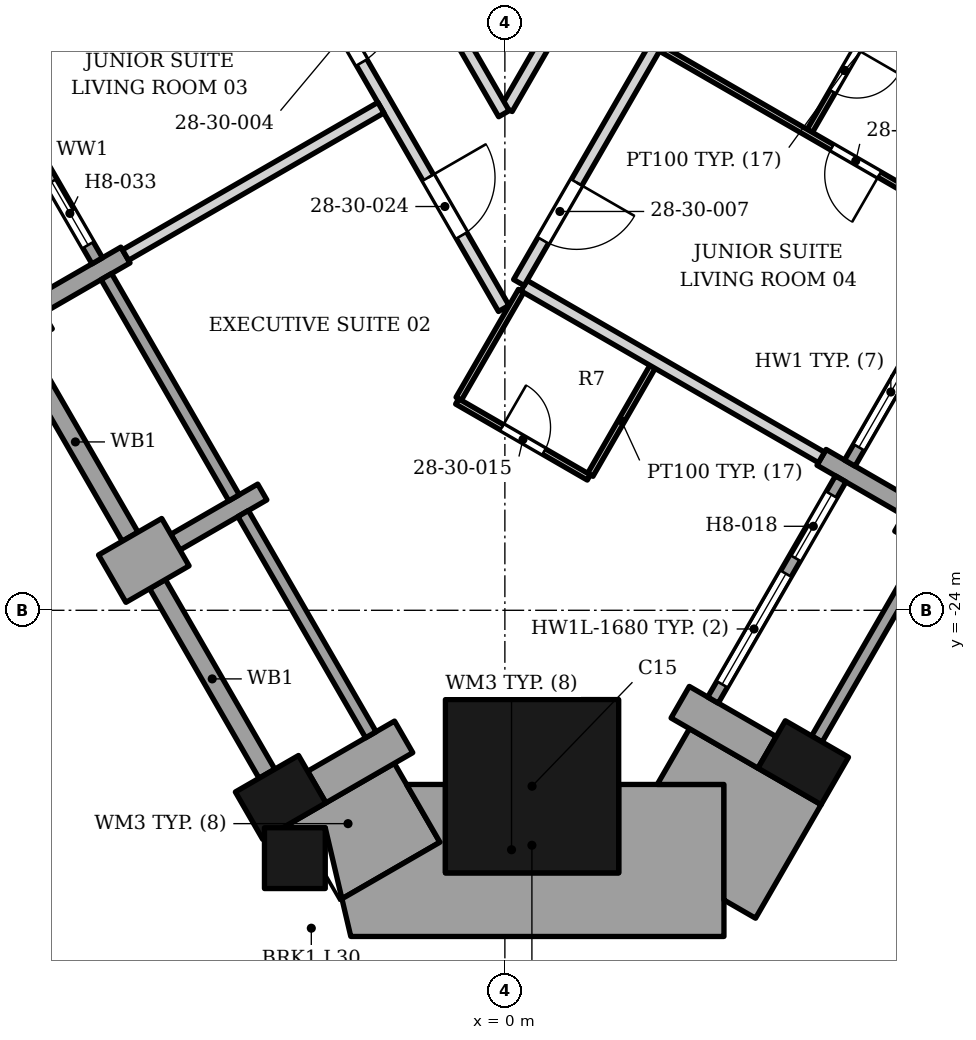
"""IFC4 building model, lengths in metres.
Left out: names, types, materials, properties, quantities, classifications, styles, units other than length and angle.
Written with IfcOpenShell. Run it as: python <this file> out.ifc"""

import sys

from ifc_helpers import new_model, si_unit, direction, frame, frame_2d, origin, origin_2d, place, context, subcontext, project, spatial, polyline, rectangle, outline, extrude, element, fill, save


model = new_model("IFC4")
c1 = context("Model", 3, precision=1e-05, world=origin(), true_north=direction((0.0, 1.0)))
c2 = subcontext(c1, "Body", "Model", "MODEL_VIEW")
j1 = project(units=[si_unit("LENGTHUNIT", "METRE"), si_unit("PLANEANGLEUNIT", "RADIAN")], contexts=[c1])
p1 = place(None, origin())
s1 = spatial("IfcSite", under=j1, at=p1, CompositionType="ELEMENT")
p2 = place(p1, origin())
s2 = spatial("IfcBuilding", under=s1, at=p2, CompositionType="ELEMENT")
p3 = place(p2, frame((0.0, 0.0, 122.4)))
s3 = spatial("IfcBuildingStorey", under=s2, at=p3, CompositionType="ELEMENT", Elevation=122.4)
p4 = place(p3, frame((0.447, -26.893, 0.0), z_axis=(0.0, 0.0, 1.0), x_axis=(0.0, 1.0, 0.0)))
e1 = element("IfcColumn", 1, at=p4, inside=s3, PredefinedType="COLUMN", context=c2, shape_type="SweptSolid", body=[
    extrude(rectangle(XDim=2.85, YDim=2.85, at=origin_2d()), origin(), (0.0, 0.0, 1.0), 3.4),
])
for number, where, z_axis, x_axis in (
    (2, (-8.188, -19.282, 0.0), (0.0, 0.0, 1.0), (0.5, -0.866, 0.0)),
    (3, (-3.688, -27.077, 0.0), (0.0, 0.0, 1.0), (0.5, -0.866, 0.0)),
    (4, (4.907, -26.506, 0.0), (0.0, 0.0, 1.0), (0.5, 0.866, 0.0)),
):
    element("IfcColumn", number, at=place(p3, frame(where, z_axis=z_axis, x_axis=x_axis)), inside=s3, PredefinedType="COLUMN", context=c2, shape_type="SweptSolid", body=[
        extrude(rectangle(XDim=0.9, YDim=1.2, at=origin_2d()), origin(), (0.0, 0.0, 1.0), 3.4),
    ])
p5 = place(p3, frame((-6.24, -18.157, 0.0), z_axis=(0.0, 0.0, 1.0), x_axis=(-0.866030301974, -0.499991515992, 0.0)))
e5 = element("IfcWall", 5, at=p5, inside=s3, PredefinedType="SOLIDWALL", context=c2, shape_type="SweptSolid", body=[
    extrude(rectangle(XDim=1.649, YDim=0.3, at=frame_2d((0.825, 0.0))), origin(), (0.0, 0.0, 1.0), 2.65),
])
p6 = place(p3, frame((-6.458, -23.479, 0.0), z_axis=(0.0, 0.0, 1.0), x_axis=(0.866043267704, 0.499969057507, 0.0)))
e6 = element("IfcWall", 6, at=p6, inside=s3, PredefinedType="SOLIDWALL", context=c2, shape_type="SweptSolid", body=[
    extrude(rectangle(XDim=1.2, YDim=0.9, at=frame_2d((0.6, 0.0))), origin(), (0.0, 0.0, 1.0), 2.63),
])
p7 = place(p3, frame((-3.99, -22.055, 0.0), z_axis=(0.0, 0.0, 1.0), x_axis=(-0.866040211805, -0.499974350878, 0.0)))
e7 = element("IfcWall", 7, at=p7, inside=s3, PredefinedType="SOLIDWALL", context=c2, shape_type="SweptSolid", body=[
    extrude(rectangle(XDim=1.65, YDim=0.3, at=frame_2d((0.825, 0.0))), origin(), (0.0, 0.0, 1.0), 2.474),
])
p8 = place(p3, frame((-3.094, -26.906, 0.0), z_axis=(0.0, 0.0, 1.0), x_axis=(0.866040211805, 0.499974350878, 0.0)))
e8 = element("IfcWall", 8, at=p8, inside=s3, PredefinedType="SOLIDWALL", context=c2, shape_type="SweptSolid", body=[
    extrude(rectangle(XDim=1.65, YDim=0.6, at=frame_2d((0.825, 0.0))), origin(), (0.0, 0.0, 1.0), 2.45),
])
p9 = place(p3, frame((-8.804, -14.615, 0.0), z_axis=(0.0, 0.0, 1.0), x_axis=(0.500002543286, -0.866023935413, 0.0)))
e9 = element("IfcWall", 9, at=p9, inside=s3, PredefinedType="ELEMENTEDWALL", context=c2, shape_type="SweptSolid", body=[
    extrude(rectangle(XDim=4.2, YDim=0.2, at=frame_2d((2.1, 0.0))), origin(), (0.0, 0.0, 1.0), 2.65),
])
p10 = place(p9, frame((0.3, 0.0, 0.6)))
e10 = element("IfcOpeningElement", 10, at=p10, cuts=e9, PredefinedType="OPENING", context=c2, shape_type="SweptSolid", body=[
    extrude(rectangle(XDim=2.1, YDim=1.8, at=frame_2d((1.05, 0.9))), frame((0.0, 0.11, 0.0), z_axis=(0.0, -1.0, 0.0), x_axis=(1.0, 0.0, 0.0)), (0.0, 0.0, 1.0), 0.22),
])
p11 = place(p9, frame((2.7, 0.0, 0.0)))
e11 = element("IfcOpeningElement", 11, at=p11, cuts=e9, PredefinedType="OPENING", context=c2, shape_type="SweptSolid", body=[
    extrude(rectangle(XDim=1.2, YDim=2.4, at=frame_2d((0.6, 1.2))), frame((0.0, 0.11, 0.0), z_axis=(0.0, -1.0, 0.0), x_axis=(1.0, 0.0, 0.0)), (0.0, 0.0, 1.0), 0.22),
])
p12 = place(p3, frame((-7.963, -19.672, 0.0), z_axis=(0.0, 0.0, 1.0), x_axis=(0.500012057535, -0.866018442252, 0.0)))
e12 = element("IfcWall", 12, at=p12, inside=s3, PredefinedType="SOLIDWALL", context=c2, shape_type="SweptSolid", body=[
    extrude(rectangle(XDim=3.6, YDim=0.3, at=frame_2d((1.8, 0.0))), origin(), (0.0, 0.0, 1.0), 2.63),
])
p13 = place(p3, frame((-6.554, -18.512, 0.0), z_axis=(0.0, 0.0, 1.0), x_axis=(0.500027713859, -0.866009402589, 0.0)))
e13 = element("IfcWall", 13, at=p13, inside=s3, PredefinedType="ELEMENTEDWALL", context=c2, shape_type="SweptSolid", body=[
    extrude(rectangle(XDim=4.2, YDim=0.2, at=frame_2d((2.1, 0.0))), origin(), (0.0, 0.0, 1.0), 2.474),
])
p14 = place(p3, frame((-5.713, -23.569, 0.0), z_axis=(0.0, 0.0, 1.0), x_axis=(0.500012057535, -0.866018442252, 0.0)))
e14 = element("IfcWall", 14, at=p14, inside=s3, PredefinedType="SOLIDWALL", context=c2, shape_type="SweptSolid", body=[
    extrude(rectangle(XDim=3.6, YDim=0.3, at=frame_2d((1.8, 0.0))), origin(), (0.0, 0.0, 1.0), 2.45),
])
p15 = place(p3, frame((-4.304, -22.409, 0.0), z_axis=(0.0, 0.0, 1.0), x_axis=(0.500002543286, -0.866023935413, 0.0)))
e15 = element("IfcWall", 15, at=p15, inside=s3, PredefinedType="ELEMENTEDWALL", context=c2, shape_type="SweptSolid", body=[
    extrude(rectangle(XDim=4.2, YDim=0.2, at=frame_2d((2.1, 0.0))), origin(), (0.0, 0.0, 1.0), 2.384),
])
p16 = place(p3, frame((4.312, -26.336, 0.0), z_axis=(0.0, 0.0, 1.0), x_axis=(-0.865976140824, 0.500085316245, 0.0)))
e16 = element("IfcWall", 16, at=p16, inside=s3, PredefinedType="SOLIDWALL", context=c2, shape_type="SweptSolid", body=[
    extrude(rectangle(XDim=1.65, YDim=0.6, at=frame_2d((0.825, 0.0))), origin(), (0.0, 0.0, 1.0), 2.45),
])
p17 = place(p3, frame((7.676, -22.909, 0.0), z_axis=(0.0, 0.0, 1.0), x_axis=(-0.866094119867, 0.499880961361, 0.0)))
e17 = element("IfcWall", 17, at=p17, inside=s3, PredefinedType="SOLIDWALL", context=c2, shape_type="SweptSolid", body=[
    extrude(rectangle(XDim=1.2, YDim=0.9, at=frame_2d((0.6, 0.0))), origin(), (0.0, 0.0, 1.0), 2.628),
])
p18 = place(p3, frame((6.637, -22.309, 0.0), z_axis=(0.0, 0.0, 1.0), x_axis=(-0.866040211805, 0.499974350878, 0.0)))
e18 = element("IfcWall", 18, at=p18, inside=s3, PredefinedType="SOLIDWALL", context=c2, shape_type="SweptSolid", body=[
    extrude(rectangle(XDim=1.65, YDim=0.3, at=frame_2d((0.825, 0.0))), origin(), (0.0, 0.0, 1.0), 2.628),
])
p19 = place(p3, origin())
e19 = element("IfcWall", 19, at=p19, inside=s3, PredefinedType="SOLIDWALL", context=c2, shape_type="SweptSolid", body=[
    extrude(outline(polyline([(6.845, -22.949), (5.045, -26.066), (5.219, -26.166), (7.018, -23.049), (6.845, -22.949)])), origin(), (0.0, 0.0, 1.0), 2.45),
])
p20 = place(p3, frame((3.423, -25.477, 0.0), z_axis=(0.0, 0.0, 1.0), x_axis=(0.499958946799, 0.866049104564, 0.0)))
e20 = element("IfcWall", 20, at=p20, inside=s3, PredefinedType="ELEMENTEDWALL", context=c2, shape_type="SweptSolid", body=[
    extrude(rectangle(XDim=4.2, YDim=0.2, at=frame_2d((2.1, 0.0))), origin(), (0.0, 0.0, 1.0), 2.384),
])
p21 = place(p20, frame((0.3, 0.0, 0.6)))
e21 = element("IfcOpeningElement", 21, at=p21, cuts=e20, PredefinedType="OPENING", context=c2, shape_type="SweptSolid", body=[
    extrude(rectangle(XDim=2.1, YDim=1.68, at=frame_2d((1.05, 0.84))), frame((0.0, 0.11, 0.0), z_axis=(0.0, -1.0, 0.0), x_axis=(1.0, 0.0, 0.0)), (0.0, 0.0, 1.0), 0.22),
])
p22 = place(p20, frame((2.7, 0.0, 0.0)))
e22 = element("IfcOpeningElement", 22, at=p22, cuts=e20, PredefinedType="OPENING", context=c2, shape_type="SweptSolid", body=[
    extrude(rectangle(XDim=1.2, YDim=2.28, at=frame_2d((0.6, 1.14))), frame((0.0, 0.11, 0.0), z_axis=(0.0, -1.0, 0.0), x_axis=(1.0, 0.0, 0.0)), (0.0, 0.0, 1.0), 0.22),
])
p23 = place(p3, frame((5.673, -21.579, 0.0), z_axis=(0.0, 0.0, 1.0), x_axis=(0.49998411664, 0.866034573852, 0.0)))
e23 = element("IfcWall", 23, at=p23, inside=s3, PredefinedType="ELEMENTEDWALL", context=c2, shape_type="SweptSolid", body=[
    extrude(rectangle(XDim=4.2, YDim=0.2, at=frame_2d((2.1, 0.0))), origin(), (0.0, 0.0, 1.0), 2.628),
])
p24 = place(p23, frame((0.3, 0.0, 0.6)))
e24 = element("IfcOpeningElement", 24, at=p24, cuts=e23, PredefinedType="OPENING", context=c2, shape_type="SweptSolid", body=[
    extrude(rectangle(XDim=2.1, YDim=1.8, at=frame_2d((1.05, 0.9))), frame((0.0, 0.11, 0.0), z_axis=(0.0, -1.0, 0.0), x_axis=(1.0, 0.0, 0.0)), (0.0, 0.0, 1.0), 0.22),
])
p25 = place(p23, frame((2.7, 0.0, 0.0)))
e25 = element("IfcOpeningElement", 25, at=p25, cuts=e23, PredefinedType="OPENING", context=c2, shape_type="SweptSolid", body=[
    extrude(rectangle(XDim=1.2, YDim=2.4, at=frame_2d((0.6, 1.2))), frame((0.0, 0.11, 0.0), z_axis=(0.0, -1.0, 0.0), x_axis=(1.0, 0.0, 0.0)), (0.0, 0.0, 1.0), 0.22),
])
p26 = place(p3, origin())
e26 = element("IfcWall", 26, at=p26, inside=s3, PredefinedType="SOLIDWALL", context=c2, shape_type="SweptSolid", body=[
    extrude(outline(polyline([(-1.069, -27.814), (-1.818, -26.516), (-2.944, -27.167), (-2.943, -27.167), (-3.652, -27.576), (-2.954, -27.576), (-2.68, -28.744), (-1.069, -27.814)])), origin(), (0.0, 0.0, 1.0), 2.63),
])
p27 = place(p3, origin())
e27 = element("IfcWall", 27, at=p27, inside=s3, PredefinedType="SOLIDWALL", context=c2, shape_type="SweptSolid", body=[
    extrude(outline(polyline([(-0.978, -26.864), (-1.617, -26.864), (-1.069, -27.814), (-2.68, -28.744), (-2.534, -29.364), (3.603, -29.364), (3.603, -26.864), (1.872, -26.864), (1.872, -28.318), (-0.978, -28.318), (-0.978, -26.864)])), origin(), (0.0, 0.0, 1.0), 2.63),
])
p28 = place(p3, origin())
e28 = element("IfcWall", 28, at=p28, inside=s3, PredefinedType="SOLIDWALL", context=c2, shape_type="SweptSolid", body=[
    extrude(outline(polyline([(5.201, -27.196), (3.036, -25.946), (2.506, -26.864), (3.603, -26.864), (3.603, -28.764), (4.123, -29.064), (5.201, -27.196)])), origin(), (0.0, 0.0, 1.0), 2.45),
])
p29 = place(p3, frame((1.405, -21.772, 0.0), z_axis=(0.0, 0.0, 1.0), x_axis=(0.499265284884, 0.866449176415, 0.0)))
e29 = element("IfcWall", 29, at=p29, inside=s3, PredefinedType="PARTITIONING", context=c2, shape_type="SweptSolid", body=[
    extrude(rectangle(XDim=2.05, YDim=0.1, at=frame_2d((1.025, 0.0))), origin(), (0.0, 0.0, 1.0), 2.384),
])
p30 = place(p3, frame((-0.785, -20.565, 0.0), z_axis=(0.0, 0.0, 1.0), x_axis=(0.866022959057, -0.500004234368, 0.0)))
e30 = element("IfcWall", 30, at=p30, inside=s3, PredefinedType="PARTITIONING", context=c2, shape_type="SweptSolid", body=[
    extrude(rectangle(XDim=2.5, YDim=0.1, at=frame_2d((1.25, 0.0))), origin(), (0.0, 0.0, 1.0), 2.474),
])
p31 = place(p30, frame((0.85, 0.0, 0.0)))
e31 = element("IfcOpeningElement", 31, at=p31, cuts=e30, PredefinedType="OPENING", context=c2, shape_type="SweptSolid", body=[
    extrude(rectangle(XDim=0.8, YDim=2.1, at=frame_2d((0.4, 1.05))), frame((0.0, 0.06, 0.0), z_axis=(0.0, -1.0, 0.0), x_axis=(1.0, 0.0, 0.0)), (0.0, 0.0, 1.0), 0.12),
])
p32 = place(p3, frame((-5.405, -9.708, 0.0), z_axis=(0.0, 0.0, 1.0), x_axis=(0.500010215181, -0.866019505967, 0.0)))
e32 = element("IfcWall", 32, at=p32, inside=s3, PredefinedType="PARTITIONING", context=c2, shape_type="SweptSolid", body=[
    extrude(rectangle(XDim=10.771, YDim=0.2, at=frame_2d((5.386, 0.0))), origin(), (0.0, 0.0, 1.0), 2.242),
])
p33 = place(p32, frame((5.0, 0.0, 0.0)))
e33 = element("IfcOpeningElement", 33, at=p33, cuts=e32, PredefinedType="OPENING", context=c2, shape_type="SweptSolid", body=[
    extrude(rectangle(XDim=1.1, YDim=2.1, at=frame_2d((0.55, 1.05))), frame((0.0, 0.11, 0.0), z_axis=(0.0, -1.0, 0.0), x_axis=(1.0, 0.0, 0.0)), (0.0, 0.0, 1.0), 0.22),
])
p34 = place(p32, frame((8.286, 0.0, 0.0)))
e34 = element("IfcOpeningElement", 34, at=p34, cuts=e32, PredefinedType="OPENING", context=c2, shape_type="SweptSolid", body=[
    extrude(rectangle(XDim=1.1, YDim=2.1, at=frame_2d((0.55, 1.05))), frame((0.0, 0.11, 0.0), z_axis=(0.0, -1.0, 0.0), x_axis=(1.0, 0.0, 0.0)), (0.0, 0.0, 1.0), 0.22),
])
p35 = place(p3, frame((-0.76, -20.522, 0.0), z_axis=(0.0, 0.0, 1.0), x_axis=(0.500646589026, 0.865651773461, 0.0)))
e35 = element("IfcWall", 35, at=p35, inside=s3, PredefinedType="PARTITIONING", context=c2, shape_type="SweptSolid", body=[
    extrude(rectangle(XDim=2.05, YDim=0.1, at=frame_2d((1.025, 0.0))), origin(), (0.0, 0.0, 1.0), 2.474),
])
p36 = place(p3, frame((0.314, -18.661, 0.0), z_axis=(0.0, 0.0, 1.0), x_axis=(0.866027263711, -0.4999967785, 0.0)))
e36 = element("IfcWall", 36, at=p36, inside=s3, PredefinedType="PARTITIONING", context=c2, shape_type="SweptSolid", body=[
    extrude(rectangle(XDim=5.649, YDim=0.2, at=frame_2d((2.825, 0.0))), origin(), (0.0, 0.0, 1.0), 2.384),
])
p37 = place(p3, frame((-6.24, -18.158, 0.0), z_axis=(0.0, 0.0, 1.0), x_axis=(0.866175528751, 0.499739885733, 0.0)))
e37 = element("IfcWall", 37, at=p37, inside=s3, PredefinedType="PARTITIONING", context=c2, shape_type="SweptSolid", body=[
    extrude(rectangle(XDim=4.85, YDim=0.2, at=frame_2d((2.425, 0.0))), origin(), (0.0, 0.0, 1.0), 2.384),
])
p38 = place(p3, frame((5.014, -16.116, 0.0), z_axis=(0.0, 0.0, 1.0), x_axis=(0.500617411337, 0.865668647617, 0.0)))
e38 = element("IfcWall", 38, at=p38, inside=s3, PredefinedType="PARTITIONING", context=c2, shape_type="SweptSolid", body=[
    extrude(rectangle(XDim=2.298, YDim=0.1, at=frame_2d((1.149, 0.0))), origin(), (0.0, 0.0, 1.0), 3.23),
])
p39 = place(p38, frame((0.748, 0.0, 0.0)))
e39 = element("IfcOpeningElement", 39, at=p39, cuts=e38, PredefinedType="OPENING", context=c2, shape_type="SweptSolid", body=[
    extrude(rectangle(XDim=0.8, YDim=2.1, at=frame_2d((0.4, 1.05))), frame((0.0, 0.06, 0.0), z_axis=(0.0, -1.0, 0.0), x_axis=(1.0, 0.0, 0.0)), (0.0, 0.0, 1.0), 0.12),
])
p40 = place(p3, frame((0.033, -15.748, 0.0), z_axis=(0.0, 0.0, 1.0), x_axis=(0.50002566634, 0.866010584809, 0.0)))
e40 = element("IfcWall", 40, at=p40, inside=s3, PredefinedType="PARTITIONING", context=c2, shape_type="SweptSolid", body=[
    extrude(rectangle(XDim=3.229, YDim=0.2, at=frame_2d((1.615, 0.0))), origin(), (0.0, 0.0, 1.0), 2.474),
])
p41 = place(p3, frame((2.566, -14.76, 0.0), z_axis=(0.0, 0.0, 1.0), x_axis=(0.866019355129, -0.500010476433, 0.0)))
e41 = element("IfcWall", 41, at=p41, inside=s3, PredefinedType="PARTITIONING", context=c2, shape_type="SweptSolid", body=[
    extrude(rectangle(XDim=5.65, YDim=0.1, at=frame_2d((2.825, 0.0))), origin(), (0.0, 0.0, 1.0), 2.384),
])
p42 = place(p41, frame((3.25, 0.0, 0.0)))
e42 = element("IfcOpeningElement", 42, at=p42, cuts=e41, PredefinedType="OPENING", context=c2, shape_type="SweptSolid", body=[
    extrude(rectangle(XDim=0.9, YDim=2.1, at=frame_2d((0.45, 1.05))), frame((0.0, 0.06, 0.0), z_axis=(0.0, -1.0, 0.0), x_axis=(1.0, 0.0, 0.0)), (0.0, 0.0, 1.0), 0.12),
])
p43 = place(p3, frame((-5.763, -5.88, 0.0), z_axis=(0.0, 0.0, 1.0), x_axis=(0.500006842847, -0.866021453029, 0.0)))
e43 = element("IfcWall", 43, at=p43, inside=s3, PredefinedType="PARTITIONING", context=c2, shape_type="SweptSolid", body=[
    extrude(rectangle(XDim=11.493, YDim=0.2, at=frame_2d((5.747, 0.0))), origin(), (0.0, 0.0, 1.0), 2.242),
])
p44 = place(p43, frame((6.914, 0.0, 0.0)))
e44 = element("IfcOpeningElement", 44, at=p44, cuts=e43, PredefinedType="OPENING", context=c2, shape_type="SweptSolid", body=[
    extrude(rectangle(XDim=0.9, YDim=2.1, at=frame_2d((0.45, 1.05))), frame((0.0, 0.11, 0.0), z_axis=(0.0, -1.0, 0.0), x_axis=(1.0, 0.0, 0.0)), (0.0, 0.0, 1.0), 0.22),
])
p45 = place(p3, frame((0.23, -18.61, 0.0), z_axis=(0.0, 0.0, 1.0), x_axis=(0.499999197515, 0.866025867099, 0.0)))
e45 = element("IfcWall", 45, at=p45, inside=s3, PredefinedType="PARTITIONING", context=c2, shape_type="SweptSolid", body=[
    extrude(rectangle(XDim=25.76, YDim=0.2, at=frame_2d((12.88, 0.0))), origin(), (0.0, 0.0, 1.0), 2.242),
])
p46 = place(p45, frame((0.8, 0.0, 0.0)))
e46 = element("IfcOpeningElement", 46, at=p46, cuts=e45, PredefinedType="OPENING", context=c2, shape_type="SweptSolid", body=[
    extrude(rectangle(XDim=1.1, YDim=2.1, at=frame_2d((0.55, 1.05))), frame((0.0, 0.11, 0.0), z_axis=(0.0, -1.0, 0.0), x_axis=(1.0, 0.0, 0.0)), (0.0, 0.0, 1.0), 0.22),
])
p47 = place(p45, frame((14.95, 0.0, 0.0)))
e47 = element("IfcOpeningElement", 47, at=p47, cuts=e45, PredefinedType="OPENING", context=c2, shape_type="SweptSolid", body=[
    extrude(rectangle(XDim=1.6, YDim=2.1, at=frame_2d((0.8, 1.05))), frame((0.0, 0.11, 0.0), z_axis=(0.0, -1.0, 0.0), x_axis=(1.0, 0.0, 0.0)), (0.0, 0.0, 1.0), 0.22),
])
p48 = place(p45, frame((23.58, 0.0, 0.0)))
e48 = element("IfcOpeningElement", 48, at=p48, cuts=e45, PredefinedType="OPENING", context=c2, shape_type="SweptSolid", body=[
    extrude(rectangle(XDim=1.1, YDim=2.1, at=frame_2d((0.55, 1.05))), frame((0.0, 0.11, 0.0), z_axis=(0.0, -1.0, 0.0), x_axis=(1.0, 0.0, 0.0)), (0.0, 0.0, 1.0), 0.22),
])
p49 = place(p11, origin())
e49 = element("IfcDoor", 49, at=p49, inside=s3, OperationType="SINGLE_SWING_LEFT", PredefinedType="DOOR", context=c2, shape_type="SweptSolid", body=[
    extrude(rectangle(XDim=1.2, YDim=2.4, at=frame_2d((0.6, 1.2))), frame((0.0, 0.025, 0.0), z_axis=(0.0, -1.0, 0.0), x_axis=(1.0, 0.0, 0.0)), (0.0, 0.0, 1.0), 0.05),
])
fill(e11, e49)
p50 = place(p21, origin())
e50 = element("IfcWindow", 50, at=p50, inside=s3, PartitioningType="SINGLE_PANEL", PredefinedType="WINDOW", context=c2, shape_type="SweptSolid", body=[
    extrude(rectangle(XDim=2.1, YDim=1.68, at=frame_2d((1.05, 0.84))), frame((0.0, 0.03, 0.0), z_axis=(0.0, -1.0, 0.0), x_axis=(1.0, 0.0, 0.0)), (0.0, 0.0, 1.0), 0.06),
])
fill(e21, e50)
p51 = place(p22, origin())
e51 = element("IfcDoor", 51, at=p51, inside=s3, OperationType="SINGLE_SWING_LEFT", PredefinedType="DOOR", context=c2, shape_type="SweptSolid", body=[
    extrude(rectangle(XDim=1.2, YDim=2.28, at=frame_2d((0.6, 1.14))), frame((0.0, 0.025, 0.0), z_axis=(0.0, -1.0, 0.0), x_axis=(1.0, 0.0, 0.0)), (0.0, 0.0, 1.0), 0.05),
])
fill(e22, e51)
p52 = place(p24, origin())
e52 = element("IfcWindow", 52, at=p52, inside=s3, PartitioningType="SINGLE_PANEL", PredefinedType="WINDOW", context=c2, shape_type="SweptSolid", body=[
    extrude(rectangle(XDim=2.1, YDim=1.8, at=frame_2d((1.05, 0.9))), frame((0.0, 0.03, 0.0), z_axis=(0.0, -1.0, 0.0), x_axis=(1.0, 0.0, 0.0)), (0.0, 0.0, 1.0), 0.06),
])
fill(e24, e52)
p53 = place(p33, origin())
e53 = element("IfcDoor", 53, at=p53, inside=s3, OperationType="SINGLE_SWING_LEFT", PredefinedType="DOOR", context=c2, shape_type="SweptSolid", body=[
    extrude(rectangle(XDim=1.1, YDim=2.1, at=frame_2d((0.55, 1.05))), frame((0.0, 0.025, 0.0), z_axis=(0.0, -1.0, 0.0), x_axis=(1.0, 0.0, 0.0)), (0.0, 0.0, 1.0), 0.05),
])
fill(e33, e53)
p54 = place(p46, origin())
e54 = element("IfcDoor", 54, at=p54, inside=s3, OperationType="SINGLE_SWING_RIGHT", PredefinedType="DOOR", context=c2, shape_type="SweptSolid", body=[
    extrude(rectangle(XDim=1.1, YDim=2.1, at=frame_2d((0.55, 1.05))), frame((0.0, 0.025, 0.0), z_axis=(0.0, -1.0, 0.0), x_axis=(1.0, 0.0, 0.0)), (0.0, 0.0, 1.0), 0.05),
])
fill(e46, e54)
p55 = place(p42, origin())
e55 = element("IfcDoor", 55, at=p55, inside=s3, OperationType="SINGLE_SWING_RIGHT", PredefinedType="DOOR", context=c2, shape_type="SweptSolid", body=[
    extrude(rectangle(XDim=0.9, YDim=2.1, at=frame_2d((0.45, 1.05))), frame((0.0, 0.025, 0.0), z_axis=(0.0, -1.0, 0.0), x_axis=(1.0, 0.0, 0.0)), (0.0, 0.0, 1.0), 0.05),
])
fill(e42, e55)
p56 = place(p39, origin())
e56 = element("IfcDoor", 56, at=p56, inside=s3, OperationType="SINGLE_SWING_RIGHT", PredefinedType="DOOR", context=c2, shape_type="SweptSolid", body=[
    extrude(rectangle(XDim=0.8, YDim=2.1, at=frame_2d((0.4, 1.05))), frame((0.0, 0.025, 0.0), z_axis=(0.0, -1.0, 0.0), x_axis=(1.0, 0.0, 0.0)), (0.0, 0.0, 1.0), 0.05),
])
fill(e39, e56)
p57 = place(p31, origin())
e57 = element("IfcDoor", 57, at=p57, inside=s3, OperationType="SINGLE_SWING_LEFT", PredefinedType="DOOR", context=c2, shape_type="SweptSolid", body=[
    extrude(rectangle(XDim=0.8, YDim=2.1, at=frame_2d((0.4, 1.05))), frame((0.0, 0.025, 0.0), z_axis=(0.0, -1.0, 0.0), x_axis=(1.0, 0.0, 0.0)), (0.0, 0.0, 1.0), 0.05),
])
fill(e31, e57)
p58 = place(p34, origin())
e58 = element("IfcDoor", 58, at=p58, inside=s3, OperationType="SINGLE_SWING_LEFT", PredefinedType="DOOR", context=c2, shape_type="SweptSolid", body=[
    extrude(rectangle(XDim=1.1, YDim=2.1, at=frame_2d((0.55, 1.05))), frame((0.0, 0.025, 0.0), z_axis=(0.0, -1.0, 0.0), x_axis=(1.0, 0.0, 0.0)), (0.0, 0.0, 1.0), 0.05),
])
fill(e34, e58)
save(model, sys.argv[1])
